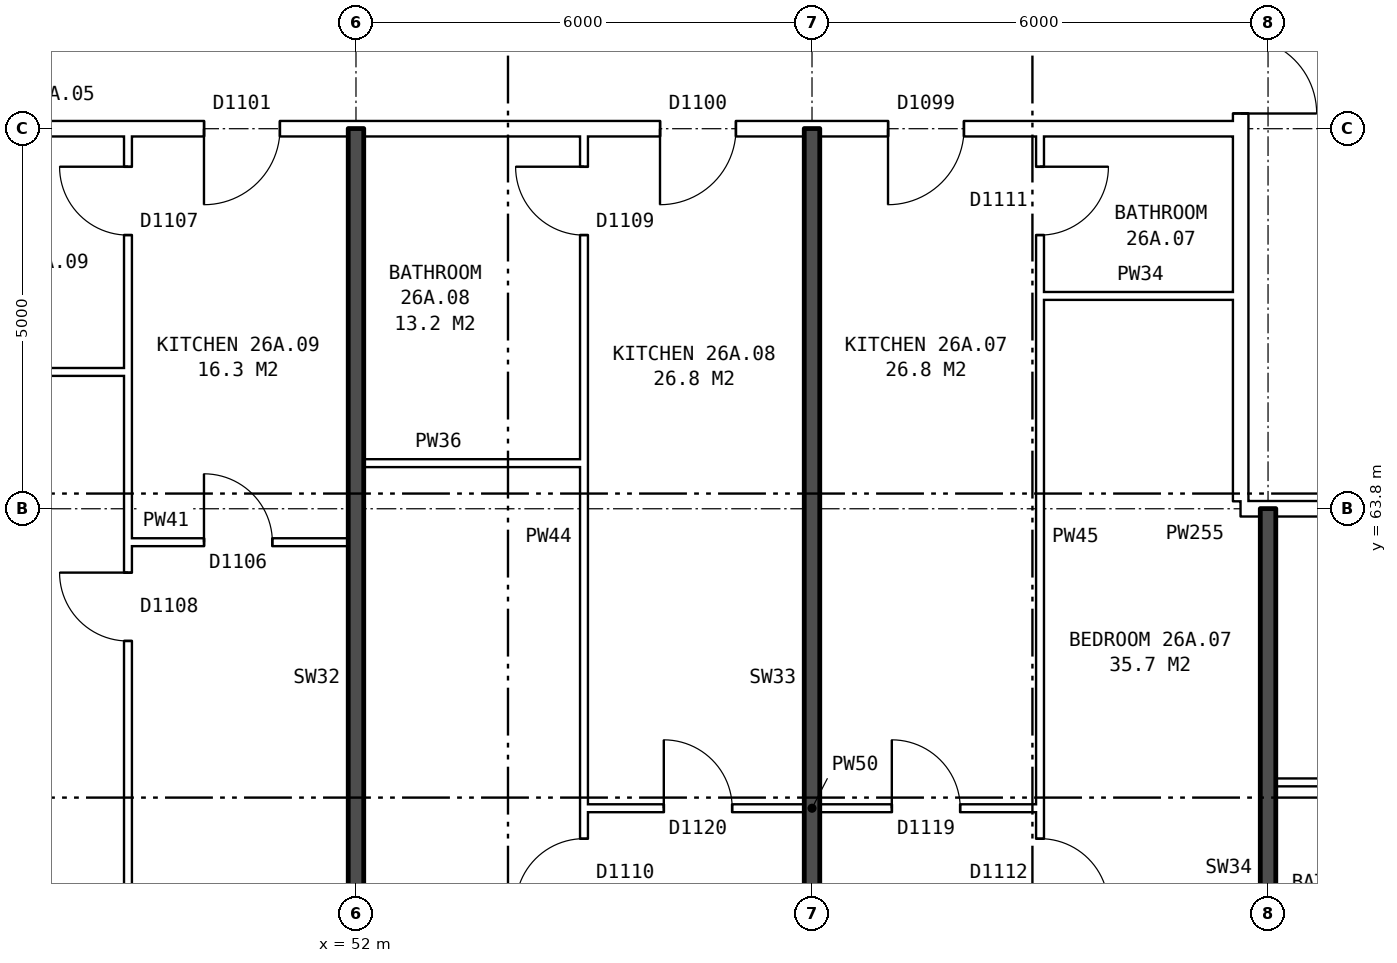
"""IFC4 building model, lengths in metres.
Left out: names, types, materials, properties, quantities, classifications, styles, units other than length and angle.
Written with IfcOpenShell. Run it as: python <this file> out.ifc"""

import sys

from ifc_helpers import new_model, si_unit, direction, frame, frame_2d, origin, place, context, subcontext, project, spatial, rectangle, extrude, element, fill, save


model = new_model("IFC4")
c1 = context("Model", 3, precision=1e-05, world=origin(), true_north=direction((0.0, 1.0)))
c2 = subcontext(c1, "Body", "Model", "MODEL_VIEW")
j1 = project(units=[si_unit("LENGTHUNIT", "METRE"), si_unit("PLANEANGLEUNIT", "RADIAN")], contexts=[c1])
p1 = place(None, origin())
s1 = spatial("IfcSite", under=j1, at=p1, CompositionType="ELEMENT")
p2 = place(p1, origin())
s2 = spatial("IfcBuilding", under=s1, at=p2, CompositionType="ELEMENT")
p3 = place(p2, frame((0.0, 0.0, 96.4)))
s3 = spatial("IfcBuildingStorey", under=s2, at=p3, CompositionType="ELEMENT", Elevation=96.4)
p4 = place(p3, frame((63.64, 63.9, 0.0), z_axis=(0.0, 0.0, 1.0), x_axis=(0.0, 1.0, 0.0)))
e1 = element("IfcWall", 1, at=p4, inside=s3, PredefinedType="PARTITIONING", context=c2, shape_type="SweptSolid", body=[
    extrude(rectangle(XDim=12.2, YDim=0.2, at=frame_2d((6.1, 0.0))), origin(), (0.0, 0.0, 1.0), 2.85),
])
p5 = place(p4, frame((5.1, 0.0, 0.0)))
e2 = element("IfcOpeningElement", 2, at=p5, cuts=e1, PredefinedType="OPENING", context=c2, shape_type="SweptSolid", body=[
    extrude(rectangle(XDim=2.0, YDim=2.1, at=frame_2d((1.0, 1.05))), frame((0.0, 0.11, 0.0), z_axis=(0.0, -1.0, 0.0), x_axis=(1.0, 0.0, 0.0)), (0.0, 0.0, 1.0), 0.22),
])
p6 = place(p3, frame((55.0, 59.86, 0.0), z_axis=(0.0, 0.0, 1.0), x_axis=(1.0, 0.0, 0.0)))
e3 = element("IfcWall", 3, at=p6, inside=s3, PredefinedType="PARTITIONING", context=c2, shape_type="SweptSolid", body=[
    extrude(rectangle(XDim=6.0, YDim=0.1, at=frame_2d((3.0, 0.0))), origin(), (0.0, 0.0, 1.0), 2.85),
])
p7 = place(p6, frame((4.05, 0.0, 0.0)))
e4 = element("IfcOpeningElement", 4, at=p7, cuts=e3, PredefinedType="OPENING", context=c2, shape_type="SweptSolid", body=[
    extrude(rectangle(XDim=0.9, YDim=2.1, at=frame_2d((0.45, 1.05))), frame((0.0, 0.06, 0.0), z_axis=(0.0, -1.0, 0.0), x_axis=(1.0, 0.0, 0.0)), (0.0, 0.0, 1.0), 0.12),
])
p8 = place(p6, frame((1.05, 0.0, 0.0)))
e5 = element("IfcOpeningElement", 5, at=p8, cuts=e3, PredefinedType="OPENING", context=c2, shape_type="SweptSolid", body=[
    extrude(rectangle(XDim=0.9, YDim=2.1, at=frame_2d((0.45, 1.05))), frame((0.0, 0.06, 0.0), z_axis=(0.0, -1.0, 0.0), x_axis=(1.0, 0.0, 0.0)), (0.0, 0.0, 1.0), 0.12),
])
p9 = place(p3, frame((64.1, 60.2, 0.0), z_axis=(0.0, 0.0, 1.0), x_axis=(1.0, 0.0, 0.0)))
e6 = element("IfcWall", 6, at=p9, inside=s3, PredefinedType="PARTITIONING", context=c2, shape_type="SweptSolid", body=[
    extrude(rectangle(XDim=5.8, YDim=0.1, at=frame_2d((2.9, 0.0))), origin(), (0.0, 0.0, 1.0), 2.85),
])
p10 = place(p9, frame((3.6, 0.0, 0.0)))
e7 = element("IfcOpeningElement", 7, at=p10, cuts=e6, PredefinedType="OPENING", context=c2, shape_type="SweptSolid", body=[
    extrude(rectangle(XDim=0.9, YDim=2.1, at=frame_2d((0.45, 1.05))), frame((0.0, 0.06, 0.0), z_axis=(0.0, -1.0, 0.0), x_axis=(1.0, 0.0, 0.0)), (0.0, 0.0, 1.0), 0.12),
])
p11 = place(p9, frame((0.7, 0.0, 0.0)))
e8 = element("IfcOpeningElement", 8, at=p11, cuts=e6, PredefinedType="OPENING", context=c2, shape_type="SweptSolid", body=[
    extrude(rectangle(XDim=0.9, YDim=2.1, at=frame_2d((0.45, 1.05))), frame((0.0, 0.06, 0.0), z_axis=(0.0, -1.0, 0.0), x_axis=(1.0, 0.0, 0.0)), (0.0, 0.0, 1.0), 0.12),
])
p12 = place(p3, frame((49.0, 63.36, 0.0), z_axis=(0.0, 0.0, 1.0), x_axis=(1.0, 0.0, 0.0)))
e9 = element("IfcWall", 9, at=p12, inside=s3, PredefinedType="PARTITIONING", context=c2, shape_type="SweptSolid", body=[
    extrude(rectangle(XDim=2.9, YDim=0.1, at=frame_2d((1.45, 0.0))), origin(), (0.0, 0.0, 1.0), 2.85),
])
p13 = place(p12, frame((1.0, 0.0, 0.0)))
e10 = element("IfcOpeningElement", 10, at=p13, cuts=e9, PredefinedType="OPENING", context=c2, shape_type="SweptSolid", body=[
    extrude(rectangle(XDim=0.9, YDim=2.1, at=frame_2d((0.45, 1.05))), frame((0.0, 0.06, 0.0), z_axis=(0.0, -1.0, 0.0), x_axis=(1.0, 0.0, 0.0)), (0.0, 0.0, 1.0), 0.12),
])
p14 = place(p3, frame((63.64, 63.8, 0.0), z_axis=(0.0, 0.0, 1.0), x_axis=(1.0, 0.0, 0.0)))
e11 = element("IfcWall", 11, at=p14, inside=s3, PredefinedType="PARTITIONING", context=c2, shape_type="SweptSolid", body=[
    extrude(rectangle(XDim=3.0, YDim=0.2, at=frame_2d((1.5, 0.0))), origin(), (0.0, 0.0, 1.0), 2.85),
])
p15 = place(p14, frame((1.18, 0.0, 0.0)))
e12 = element("IfcOpeningElement", 12, at=p15, cuts=e11, PredefinedType="OPENING", context=c2, shape_type="SweptSolid", body=[
    extrude(rectangle(XDim=1.0, YDim=2.1, at=frame_2d((0.5, 1.05))), frame((0.0, 0.11, 0.0), z_axis=(0.0, -1.0, 0.0), x_axis=(1.0, 0.0, 0.0)), (0.0, 0.0, 1.0), 0.22),
])
for number, where, z_axis, x_axis in (
    (13, (52.1, 64.4, 0.0), (0.0, 0.0, 1.0), (1.0, 0.0, 0.0)),
    (14, (46.1, 65.6, 0.0), (0.0, 0.0, 1.0), (1.0, 0.0, 0.0)),
):
    element("IfcWall", number, at=place(p3, frame(where, z_axis=z_axis, x_axis=x_axis)), inside=s3, PredefinedType="PARTITIONING", context=c2, shape_type="SweptSolid", body=[
        extrude(rectangle(XDim=2.9, YDim=0.1, at=frame_2d((1.45, 0.0))), origin(), (0.0, 0.0, 1.0), 2.85),
    ])
p16 = place(p3, frame((61.0, 66.6, 0.0), z_axis=(0.0, 0.0, 1.0), x_axis=(1.0, 0.0, 0.0)))
e15 = element("IfcWall", 15, at=p16, inside=s3, PredefinedType="PARTITIONING", context=c2, shape_type="SweptSolid", body=[
    extrude(rectangle(XDim=2.64, YDim=0.1, at=frame_2d((1.32, 0.0))), origin(), (0.0, 0.0, 1.0), 2.85),
])
p17 = place(p3, frame((44.36, 68.8, 0.0), z_axis=(0.0, 0.0, 1.0), x_axis=(1.0, 0.0, 0.0)))
e16 = element("IfcWall", 16, at=p17, inside=s3, PredefinedType="PARTITIONING", context=c2, shape_type="SweptSolid", body=[
    extrude(rectangle(XDim=19.28, YDim=0.2, at=frame_2d((9.64, 0.0))), origin(), (0.0, 0.0, 1.0), 2.85),
])
p18 = place(p17, frame((14.64, 0.0, 0.0)))
e17 = element("IfcOpeningElement", 17, at=p18, cuts=e16, PredefinedType="OPENING", context=c2, shape_type="SweptSolid", body=[
    extrude(rectangle(XDim=1.0, YDim=2.1, at=frame_2d((0.5, 1.05))), frame((0.0, 0.11, 0.0), z_axis=(0.0, -1.0, 0.0), x_axis=(1.0, 0.0, 0.0)), (0.0, 0.0, 1.0), 0.22),
])
p19 = place(p17, frame((11.64, 0.0, 0.0)))
e18 = element("IfcOpeningElement", 18, at=p19, cuts=e16, PredefinedType="OPENING", context=c2, shape_type="SweptSolid", body=[
    extrude(rectangle(XDim=1.0, YDim=2.1, at=frame_2d((0.5, 1.05))), frame((0.0, 0.11, 0.0), z_axis=(0.0, -1.0, 0.0), x_axis=(1.0, 0.0, 0.0)), (0.0, 0.0, 1.0), 0.22),
])
p20 = place(p17, frame((5.64, 0.0, 0.0)))
e19 = element("IfcOpeningElement", 19, at=p20, cuts=e16, PredefinedType="OPENING", context=c2, shape_type="SweptSolid", body=[
    extrude(rectangle(XDim=1.0, YDim=2.1, at=frame_2d((0.5, 1.05))), frame((0.0, 0.11, 0.0), z_axis=(0.0, -1.0, 0.0), x_axis=(1.0, 0.0, 0.0)), (0.0, 0.0, 1.0), 0.22),
])
p21 = place(p3, frame((49.0, 54.36, 0.0), z_axis=(0.0, 0.0, 1.0), x_axis=(0.0, 1.0, 0.0)))
e20 = element("IfcWall", 20, at=p21, inside=s3, PredefinedType="PARTITIONING", context=c2, shape_type="SweptSolid", body=[
    extrude(rectangle(XDim=14.34, YDim=0.1, at=frame_2d((7.17, 0.0))), origin(), (0.0, 0.0, 1.0), 2.85),
])
p22 = place(p21, frame((7.7, 0.0, 0.0)))
e21 = element("IfcOpeningElement", 21, at=p22, cuts=e20, PredefinedType="OPENING", context=c2, shape_type="SweptSolid", body=[
    extrude(rectangle(XDim=0.9, YDim=2.1, at=frame_2d((0.45, 1.05))), frame((0.0, 0.06, 0.0), z_axis=(0.0, -1.0, 0.0), x_axis=(1.0, 0.0, 0.0)), (0.0, 0.0, 1.0), 0.12),
])
p23 = place(p21, frame((13.04, 0.0, 0.0)))
e22 = element("IfcOpeningElement", 22, at=p23, cuts=e20, PredefinedType="OPENING", context=c2, shape_type="SweptSolid", body=[
    extrude(rectangle(XDim=0.9, YDim=2.1, at=frame_2d((0.45, 1.05))), frame((0.0, 0.06, 0.0), z_axis=(0.0, -1.0, 0.0), x_axis=(1.0, 0.0, 0.0)), (0.0, 0.0, 1.0), 0.12),
])
p24 = place(p3, frame((52.0, 54.36, 0.0), z_axis=(0.0, 0.0, 1.0), x_axis=(0.0, 1.0, 0.0)))
e23 = element("IfcWall", 23, at=p24, inside=s3, PredefinedType="SOLIDWALL", context=c2, shape_type="SweptSolid", body=[
    extrude(rectangle(XDim=14.44, YDim=0.2, at=frame_2d((7.22, 0.0))), origin(), (0.0, 0.0, 1.0), 2.85),
])
p25 = place(p3, frame((55.0, 54.36, 0.0), z_axis=(0.0, 0.0, 1.0), x_axis=(0.0, 1.0, 0.0)))
e24 = element("IfcWall", 24, at=p25, inside=s3, PredefinedType="PARTITIONING", context=c2, shape_type="SweptSolid", body=[
    extrude(rectangle(XDim=14.34, YDim=0.1, at=frame_2d((7.17, 0.0))), origin(), (0.0, 0.0, 1.0), 2.85),
])
p26 = place(p25, frame((4.2, 0.0, 0.0)))
e25 = element("IfcOpeningElement", 25, at=p26, cuts=e24, PredefinedType="OPENING", context=c2, shape_type="SweptSolid", body=[
    extrude(rectangle(XDim=0.9, YDim=2.1, at=frame_2d((0.45, 1.05))), frame((0.0, 0.06, 0.0), z_axis=(0.0, -1.0, 0.0), x_axis=(1.0, 0.0, 0.0)), (0.0, 0.0, 1.0), 0.12),
])
p27 = place(p25, frame((13.04, 0.0, 0.0)))
e26 = element("IfcOpeningElement", 26, at=p27, cuts=e24, PredefinedType="OPENING", context=c2, shape_type="SweptSolid", body=[
    extrude(rectangle(XDim=0.9, YDim=2.1, at=frame_2d((0.45, 1.05))), frame((0.0, 0.06, 0.0), z_axis=(0.0, -1.0, 0.0), x_axis=(1.0, 0.0, 0.0)), (0.0, 0.0, 1.0), 0.12),
])
p28 = place(p3, frame((58.0, 54.36, 0.0), z_axis=(0.0, 0.0, 1.0), x_axis=(0.0, 1.0, 0.0)))
e27 = element("IfcWall", 27, at=p28, inside=s3, PredefinedType="SOLIDWALL", context=c2, shape_type="SweptSolid", body=[
    extrude(rectangle(XDim=14.44, YDim=0.2, at=frame_2d((7.22, 0.0))), origin(), (0.0, 0.0, 1.0), 2.85),
])
p29 = place(p3, frame((61.0, 54.36, 0.0), z_axis=(0.0, 0.0, 1.0), x_axis=(0.0, 1.0, 0.0)))
e28 = element("IfcWall", 28, at=p29, inside=s3, PredefinedType="PARTITIONING", context=c2, shape_type="SweptSolid", body=[
    extrude(rectangle(XDim=14.34, YDim=0.1, at=frame_2d((7.17, 0.0))), origin(), (0.0, 0.0, 1.0), 2.85),
])
p30 = place(p29, frame((4.2, 0.0, 0.0)))
e29 = element("IfcOpeningElement", 29, at=p30, cuts=e28, PredefinedType="OPENING", context=c2, shape_type="SweptSolid", body=[
    extrude(rectangle(XDim=0.9, YDim=2.1, at=frame_2d((0.45, 1.05))), frame((0.0, 0.06, 0.0), z_axis=(0.0, -1.0, 0.0), x_axis=(1.0, 0.0, 0.0)), (0.0, 0.0, 1.0), 0.12),
])
p31 = place(p29, frame((13.04, 0.0, 0.0)))
e30 = element("IfcOpeningElement", 30, at=p31, cuts=e28, PredefinedType="OPENING", context=c2, shape_type="SweptSolid", body=[
    extrude(rectangle(XDim=0.9, YDim=2.1, at=frame_2d((0.45, 1.05))), frame((0.0, 0.06, 0.0), z_axis=(0.0, -1.0, 0.0), x_axis=(1.0, 0.0, 0.0)), (0.0, 0.0, 1.0), 0.12),
])
p32 = place(p3, frame((64.0, 54.36, 0.0), z_axis=(0.0, 0.0, 1.0), x_axis=(0.0, 1.0, 0.0)))
e31 = element("IfcWall", 31, at=p32, inside=s3, PredefinedType="SOLIDWALL", context=c2, shape_type="SweptSolid", body=[
    extrude(rectangle(XDim=9.44, YDim=0.2, at=frame_2d((4.72, 0.0))), origin(), (0.0, 0.0, 1.0), 2.85),
])
p33 = place(p5, frame((2.0, 0.0, 0.0), z_axis=(0.0, 0.0, 1.0), x_axis=(-1.0, 0.0, 0.0)))
e32 = element("IfcDoor", 32, at=p33, inside=s3, OperationType="DOUBLE_DOOR_SINGLE_SWING", PredefinedType="DOOR", context=c2, shape_type="SweptSolid", body=[
    extrude(rectangle(XDim=2.0, YDim=2.1, at=frame_2d((1.0, 1.05))), frame((0.0, 0.025, 0.0), z_axis=(0.0, -1.0, 0.0), x_axis=(1.0, 0.0, 0.0)), (0.0, 0.0, 1.0), 0.05),
])
fill(e2, e32)
p34 = place(p30, frame((0.9, 0.0, 0.0), z_axis=(0.0, 0.0, 1.0), x_axis=(-1.0, 0.0, 0.0)))
e33 = element("IfcDoor", 33, at=p34, inside=s3, OperationType="SINGLE_SWING_RIGHT", PredefinedType="DOOR", context=c2, shape_type="SweptSolid", body=[
    extrude(rectangle(XDim=0.9, YDim=2.1, at=frame_2d((0.45, 1.05))), frame((0.0, 0.025, 0.0), z_axis=(0.0, -1.0, 0.0), x_axis=(1.0, 0.0, 0.0)), (0.0, 0.0, 1.0), 0.05),
])
fill(e29, e33)
p35 = place(p18, frame((1.0, 0.0, 0.0), z_axis=(0.0, 0.0, 1.0), x_axis=(-1.0, 0.0, 0.0)))
e34 = element("IfcDoor", 34, at=p35, inside=s3, OperationType="SINGLE_SWING_RIGHT", PredefinedType="DOOR", context=c2, shape_type="SweptSolid", body=[
    extrude(rectangle(XDim=1.0, YDim=2.1, at=frame_2d((0.5, 1.05))), frame((0.0, 0.025, 0.0), z_axis=(0.0, -1.0, 0.0), x_axis=(1.0, 0.0, 0.0)), (0.0, 0.0, 1.0), 0.05),
])
fill(e17, e34)
p36 = place(p7, origin())
e35 = element("IfcDoor", 35, at=p36, inside=s3, OperationType="SINGLE_SWING_LEFT", PredefinedType="DOOR", context=c2, shape_type="SweptSolid", body=[
    extrude(rectangle(XDim=0.9, YDim=2.1, at=frame_2d((0.45, 1.05))), frame((0.0, 0.025, 0.0), z_axis=(0.0, -1.0, 0.0), x_axis=(1.0, 0.0, 0.0)), (0.0, 0.0, 1.0), 0.05),
])
fill(e4, e35)
p37 = place(p31, frame((0.9, 0.0, 0.0), z_axis=(0.0, 0.0, 1.0), x_axis=(-1.0, 0.0, 0.0)))
e36 = element("IfcDoor", 36, at=p37, inside=s3, OperationType="SINGLE_SWING_LEFT", PredefinedType="DOOR", context=c2, shape_type="SweptSolid", body=[
    extrude(rectangle(XDim=0.9, YDim=2.1, at=frame_2d((0.45, 1.05))), frame((0.0, 0.025, 0.0), z_axis=(0.0, -1.0, 0.0), x_axis=(1.0, 0.0, 0.0)), (0.0, 0.0, 1.0), 0.05),
])
fill(e30, e36)
p38 = place(p26, origin())
e37 = element("IfcDoor", 37, at=p38, inside=s3, OperationType="SINGLE_SWING_LEFT", PredefinedType="DOOR", context=c2, shape_type="SweptSolid", body=[
    extrude(rectangle(XDim=0.9, YDim=2.1, at=frame_2d((0.45, 1.05))), frame((0.0, 0.025, 0.0), z_axis=(0.0, -1.0, 0.0), x_axis=(1.0, 0.0, 0.0)), (0.0, 0.0, 1.0), 0.05),
])
fill(e25, e37)
p39 = place(p19, frame((1.0, 0.0, 0.0), z_axis=(0.0, 0.0, 1.0), x_axis=(-1.0, 0.0, 0.0)))
e38 = element("IfcDoor", 38, at=p39, inside=s3, OperationType="SINGLE_SWING_RIGHT", PredefinedType="DOOR", context=c2, shape_type="SweptSolid", body=[
    extrude(rectangle(XDim=1.0, YDim=2.1, at=frame_2d((0.5, 1.05))), frame((0.0, 0.025, 0.0), z_axis=(0.0, -1.0, 0.0), x_axis=(1.0, 0.0, 0.0)), (0.0, 0.0, 1.0), 0.05),
])
fill(e18, e38)
p40 = place(p8, origin())
e39 = element("IfcDoor", 39, at=p40, inside=s3, OperationType="SINGLE_SWING_LEFT", PredefinedType="DOOR", context=c2, shape_type="SweptSolid", body=[
    extrude(rectangle(XDim=0.9, YDim=2.1, at=frame_2d((0.45, 1.05))), frame((0.0, 0.025, 0.0), z_axis=(0.0, -1.0, 0.0), x_axis=(1.0, 0.0, 0.0)), (0.0, 0.0, 1.0), 0.05),
])
fill(e5, e39)
p41 = place(p27, origin())
e40 = element("IfcDoor", 40, at=p41, inside=s3, OperationType="SINGLE_SWING_RIGHT", PredefinedType="DOOR", context=c2, shape_type="SweptSolid", body=[
    extrude(rectangle(XDim=0.9, YDim=2.1, at=frame_2d((0.45, 1.05))), frame((0.0, 0.025, 0.0), z_axis=(0.0, -1.0, 0.0), x_axis=(1.0, 0.0, 0.0)), (0.0, 0.0, 1.0), 0.05),
])
fill(e26, e40)
p42 = place(p22, origin())
e41 = element("IfcDoor", 41, at=p42, inside=s3, OperationType="SINGLE_SWING_RIGHT", PredefinedType="DOOR", context=c2, shape_type="SweptSolid", body=[
    extrude(rectangle(XDim=0.9, YDim=2.1, at=frame_2d((0.45, 1.05))), frame((0.0, 0.025, 0.0), z_axis=(0.0, -1.0, 0.0), x_axis=(1.0, 0.0, 0.0)), (0.0, 0.0, 1.0), 0.05),
])
fill(e21, e41)
p43 = place(p20, frame((1.0, 0.0, 0.0), z_axis=(0.0, 0.0, 1.0), x_axis=(-1.0, 0.0, 0.0)))
e42 = element("IfcDoor", 42, at=p43, inside=s3, OperationType="SINGLE_SWING_RIGHT", PredefinedType="DOOR", context=c2, shape_type="SweptSolid", body=[
    extrude(rectangle(XDim=1.0, YDim=2.1, at=frame_2d((0.5, 1.05))), frame((0.0, 0.025, 0.0), z_axis=(0.0, -1.0, 0.0), x_axis=(1.0, 0.0, 0.0)), (0.0, 0.0, 1.0), 0.05),
])
fill(e19, e42)
p44 = place(p13, origin())
e43 = element("IfcDoor", 43, at=p44, inside=s3, OperationType="SINGLE_SWING_LEFT", PredefinedType="DOOR", context=c2, shape_type="SweptSolid", body=[
    extrude(rectangle(XDim=0.9, YDim=2.1, at=frame_2d((0.45, 1.05))), frame((0.0, 0.025, 0.0), z_axis=(0.0, -1.0, 0.0), x_axis=(1.0, 0.0, 0.0)), (0.0, 0.0, 1.0), 0.05),
])
fill(e10, e43)
p45 = place(p23, origin())
e44 = element("IfcDoor", 44, at=p45, inside=s3, OperationType="SINGLE_SWING_RIGHT", PredefinedType="DOOR", context=c2, shape_type="SweptSolid", body=[
    extrude(rectangle(XDim=0.9, YDim=2.1, at=frame_2d((0.45, 1.05))), frame((0.0, 0.025, 0.0), z_axis=(0.0, -1.0, 0.0), x_axis=(1.0, 0.0, 0.0)), (0.0, 0.0, 1.0), 0.05),
])
fill(e22, e44)
save(model, sys.argv[1])
